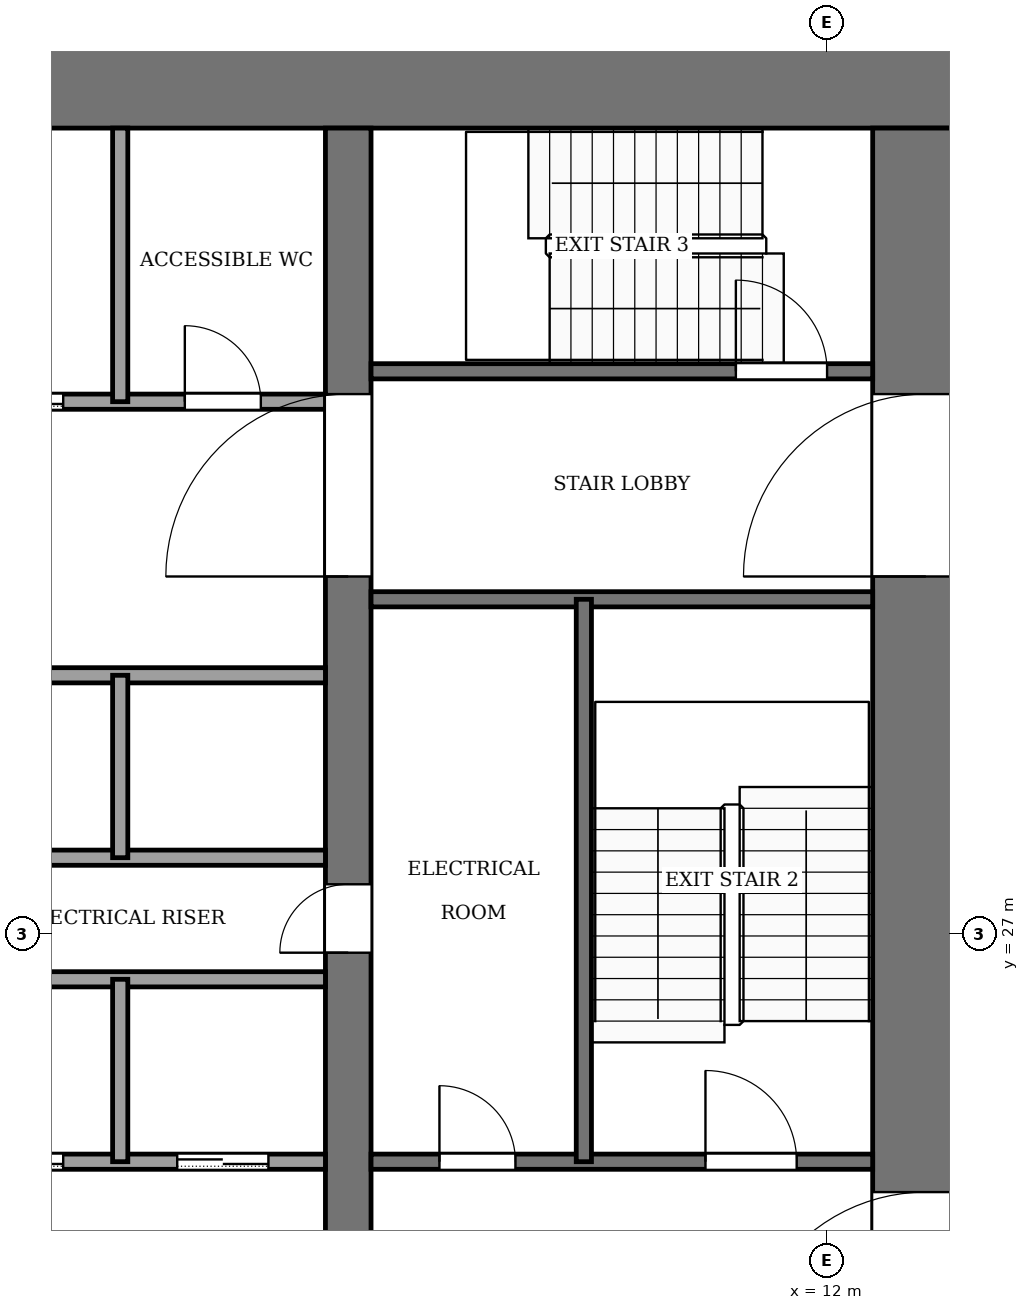
"""IFC4 building model, lengths in metres.
Left out: names, types, materials, properties, quantities, classifications, styles, units other than length and angle.
Written with IfcOpenShell. Run it as: python <this file> out.ifc"""

import sys

from ifc_helpers import new_model, si_unit, direction, frame, frame_2d, origin, place, context, subcontext, project, spatial, rectangle, extrude, element, fill, save


model = new_model("IFC4")
c1 = context("Model", 3, precision=1e-05, world=origin(), true_north=direction((0.0, 1.0)))
c2 = subcontext(c1, "Body", "Model", "MODEL_VIEW")
j1 = project(units=[si_unit("LENGTHUNIT", "METRE"), si_unit("PLANEANGLEUNIT", "RADIAN")], contexts=[c1])
p1 = place(None, origin())
s1 = spatial("IfcSite", under=j1, at=p1, CompositionType="ELEMENT")
p2 = place(p1, origin())
s2 = spatial("IfcBuilding", under=s1, at=p2, CompositionType="ELEMENT")
p3 = place(p2, frame((0.0, 0.0, 38.0)))
s3 = spatial("IfcBuildingStorey", under=s2, at=p3, CompositionType="ELEMENT", Elevation=38.0)
p4 = place(p3, frame((-14.0, 38.3, -0.13), z_axis=(0.0, 0.0, 1.0), x_axis=(1.0, 0.0, 0.0)))
e1 = element("IfcWall", 1, at=p4, inside=s3, PredefinedType="SHEAR", context=c2, shape_type="SweptSolid", body=[
    extrude(rectangle(XDim=28.0, YDim=1.4, at=frame_2d((14.0, 0.0))), origin(), (0.0, 0.0, 1.0), 4.0),
])
p5 = place(p3, frame((13.3, 18.4, -0.13), z_axis=(0.0, 0.0, 1.0), x_axis=(0.0, 1.0, 0.0)))
e2 = element("IfcWall", 2, at=p5, inside=s3, PredefinedType="SHEAR", context=c2, shape_type="SweptSolid", body=[
    extrude(rectangle(XDim=19.2, YDim=1.4, at=frame_2d((9.6, 0.0))), origin(), (0.0, 0.0, 1.0), 4.0),
])
p6 = place(p5, frame((2.8, 0.0, 0.13)))
e3 = element("IfcOpeningElement", 3, at=p6, cuts=e2, PredefinedType="OPENING", context=c2, shape_type="SweptSolid", body=[
    extrude(rectangle(XDim=2.4, YDim=2.4, at=frame_2d((1.2, 1.2))), frame((0.0, 0.71, 0.0), z_axis=(0.0, -1.0, 0.0), x_axis=(1.0, 0.0, 0.0)), (0.0, 0.0, 1.0), 1.42),
])
p7 = place(p5, frame((13.3, 0.0, 0.13)))
e4 = element("IfcOpeningElement", 4, at=p7, cuts=e2, PredefinedType="OPENING", context=c2, shape_type="SweptSolid", body=[
    extrude(rectangle(XDim=2.4, YDim=2.4, at=frame_2d((1.2, 1.2))), frame((0.0, 0.71, 0.0), z_axis=(0.0, -1.0, 0.0), x_axis=(1.0, 0.0, 0.0)), (0.0, 0.0, 1.0), 1.42),
])
p8 = place(p3, frame((5.7, 18.4, -0.13), z_axis=(0.0, 0.0, 1.0), x_axis=(0.0, 1.0, 0.0)))
e5 = element("IfcWall", 5, at=p8, inside=s3, PredefinedType="SHEAR", context=c2, shape_type="SweptSolid", body=[
    extrude(rectangle(XDim=19.2, YDim=0.6, at=frame_2d((9.6, 0.0))), origin(), (0.0, 0.0, 1.0), 4.0),
])
p9 = place(p8, frame((8.35, 0.0, 0.13)))
e6 = element("IfcOpeningElement", 6, at=p9, cuts=e5, PredefinedType="OPENING", context=c2, shape_type="SweptSolid", body=[
    extrude(rectangle(XDim=0.9, YDim=2.1, at=frame_2d((0.45, 1.05))), frame((0.0, 0.31, 0.0), z_axis=(0.0, -1.0, 0.0), x_axis=(1.0, 0.0, 0.0)), (0.0, 0.0, 1.0), 0.62),
])
p10 = place(p8, frame((13.3, 0.0, 0.13)))
e7 = element("IfcOpeningElement", 7, at=p10, cuts=e5, PredefinedType="OPENING", context=c2, shape_type="SweptSolid", body=[
    extrude(rectangle(XDim=2.4, YDim=2.4, at=frame_2d((1.2, 1.2))), frame((0.0, 0.31, 0.0), z_axis=(0.0, -1.0, 0.0), x_axis=(1.0, 0.0, 0.0)), (0.0, 0.0, 1.0), 0.62),
])
p11 = place(p3, frame((-5.4, 24.0, 0.0), z_axis=(0.0, 0.0, 1.0), x_axis=(1.0, 0.0, 0.0)))
e8 = element("IfcWall", 8, at=p11, inside=s3, PredefinedType="PARTITIONING", context=c2, shape_type="SweptSolid", body=[
    extrude(rectangle(XDim=10.8, YDim=0.2, at=frame_2d((5.4, 0.0))), origin(), (0.0, 0.0, 1.0), 3.87),
])
p12 = place(p11, frame((0.75, 0.0, 0.0)))
e9 = element("IfcOpeningElement", 9, at=p12, cuts=e8, PredefinedType="OPENING", context=c2, shape_type="SweptSolid", body=[
    extrude(rectangle(XDim=1.2, YDim=2.2, at=frame_2d((0.6, 1.1))), frame((0.0, 0.11, 0.0), z_axis=(0.0, -1.0, 0.0), x_axis=(1.0, 0.0, 0.0)), (0.0, 0.0, 1.0), 0.22),
])
p13 = place(p11, frame((3.45, 0.0, 0.0)))
e10 = element("IfcOpeningElement", 10, at=p13, cuts=e8, PredefinedType="OPENING", context=c2, shape_type="SweptSolid", body=[
    extrude(rectangle(XDim=1.2, YDim=2.2, at=frame_2d((0.6, 1.1))), frame((0.0, 0.11, 0.0), z_axis=(0.0, -1.0, 0.0), x_axis=(1.0, 0.0, 0.0)), (0.0, 0.0, 1.0), 0.22),
])
p14 = place(p11, frame((6.15, 0.0, 0.0)))
e11 = element("IfcOpeningElement", 11, at=p14, cuts=e8, PredefinedType="OPENING", context=c2, shape_type="SweptSolid", body=[
    extrude(rectangle(XDim=1.2, YDim=2.2, at=frame_2d((0.6, 1.1))), frame((0.0, 0.11, 0.0), z_axis=(0.0, -1.0, 0.0), x_axis=(1.0, 0.0, 0.0)), (0.0, 0.0, 1.0), 0.22),
])
p15 = place(p11, frame((8.85, 0.0, 0.0)))
e12 = element("IfcOpeningElement", 12, at=p15, cuts=e8, PredefinedType="OPENING", context=c2, shape_type="SweptSolid", body=[
    extrude(rectangle(XDim=1.2, YDim=2.2, at=frame_2d((0.6, 1.1))), frame((0.0, 0.11, 0.0), z_axis=(0.0, -1.0, 0.0), x_axis=(1.0, 0.0, 0.0)), (0.0, 0.0, 1.0), 0.22),
])
p16 = place(p3, frame((6.0, 24.0, 0.0), z_axis=(0.0, 0.0, 1.0), x_axis=(1.0, 0.0, 0.0)))
e13 = element("IfcWall", 13, at=p16, inside=s3, PredefinedType="PARTITIONING", context=c2, shape_type="SweptSolid", body=[
    extrude(rectangle(XDim=6.6, YDim=0.2, at=frame_2d((3.3, 0.0))), origin(), (0.0, 0.0, 1.0), 3.87),
])
p17 = place(p16, frame((0.9, 0.0, 0.0)))
e14 = element("IfcOpeningElement", 14, at=p17, cuts=e13, PredefinedType="OPENING", context=c2, shape_type="SweptSolid", body=[
    extrude(rectangle(XDim=1.0, YDim=2.1, at=frame_2d((0.5, 1.05))), frame((0.0, 0.11, 0.0), z_axis=(0.0, -1.0, 0.0), x_axis=(1.0, 0.0, 0.0)), (0.0, 0.0, 1.0), 0.22),
])
p18 = place(p16, frame((4.4, 0.0, 0.0)))
e15 = element("IfcOpeningElement", 15, at=p18, cuts=e13, PredefinedType="OPENING", context=c2, shape_type="SweptSolid", body=[
    extrude(rectangle(XDim=1.2, YDim=2.2, at=frame_2d((0.6, 1.1))), frame((0.0, 0.11, 0.0), z_axis=(0.0, -1.0, 0.0), x_axis=(1.0, 0.0, 0.0)), (0.0, 0.0, 1.0), 0.22),
])
for number, where, z_axis, x_axis in (
    (16, (-5.4, 26.4, 0.0), (0.0, 0.0, 1.0), (1.0, 0.0, 0.0)),
    (17, (-5.4, 28.0, 0.0), (0.0, 0.0, 1.0), (1.0, 0.0, 0.0)),
    (18, (-5.4, 30.4, 0.0), (0.0, 0.0, 1.0), (1.0, 0.0, 0.0)),
):
    element("IfcWall", number, at=place(p3, frame(where, z_axis=z_axis, x_axis=x_axis)), inside=s3, PredefinedType="PARTITIONING", context=c2, shape_type="SweptSolid", body=[
        extrude(rectangle(XDim=10.8, YDim=0.2, at=frame_2d((5.4, 0.0))), origin(), (0.0, 0.0, 1.0), 3.87),
    ])
p19 = place(p3, frame((6.0, 31.4, 0.0), z_axis=(0.0, 0.0, 1.0), x_axis=(1.0, 0.0, 0.0)))
e19 = element("IfcWall", 19, at=p19, inside=s3, PredefinedType="PARTITIONING", context=c2, shape_type="SweptSolid", body=[
    extrude(rectangle(XDim=6.6, YDim=0.2, at=frame_2d((3.3, 0.0))), origin(), (0.0, 0.0, 1.0), 3.87),
])
p20 = place(p3, frame((-5.4, 34.0, 0.0), z_axis=(0.0, 0.0, 1.0), x_axis=(1.0, 0.0, 0.0)))
e20 = element("IfcWall", 20, at=p20, inside=s3, PredefinedType="PARTITIONING", context=c2, shape_type="SweptSolid", body=[
    extrude(rectangle(XDim=10.8, YDim=0.2, at=frame_2d((5.4, 0.0))), origin(), (0.0, 0.0, 1.0), 3.87),
])
p21 = place(p20, frame((6.15, 0.0, 0.0)))
e21 = element("IfcOpeningElement", 21, at=p21, cuts=e20, PredefinedType="OPENING", context=c2, shape_type="SweptSolid", body=[
    extrude(rectangle(XDim=1.2, YDim=2.2, at=frame_2d((0.6, 1.1))), frame((0.0, 0.11, 0.0), z_axis=(0.0, -1.0, 0.0), x_axis=(1.0, 0.0, 0.0)), (0.0, 0.0, 1.0), 0.22),
])
p22 = place(p20, frame((8.95, 0.0, 0.0)))
e22 = element("IfcOpeningElement", 22, at=p22, cuts=e20, PredefinedType="OPENING", context=c2, shape_type="SweptSolid", body=[
    extrude(rectangle(XDim=1.0, YDim=2.1, at=frame_2d((0.5, 1.05))), frame((0.0, 0.11, 0.0), z_axis=(0.0, -1.0, 0.0), x_axis=(1.0, 0.0, 0.0)), (0.0, 0.0, 1.0), 0.22),
])
p23 = place(p3, frame((6.0, 34.4, 0.0), z_axis=(0.0, 0.0, 1.0), x_axis=(1.0, 0.0, 0.0)))
e23 = element("IfcWall", 23, at=p23, inside=s3, PredefinedType="PARTITIONING", context=c2, shape_type="SweptSolid", body=[
    extrude(rectangle(XDim=6.6, YDim=0.2, at=frame_2d((3.3, 0.0))), origin(), (0.0, 0.0, 1.0), 3.87),
])
p24 = place(p23, frame((4.8, 0.0, 0.0)))
e24 = element("IfcOpeningElement", 24, at=p24, cuts=e23, PredefinedType="OPENING", context=c2, shape_type="SweptSolid", body=[
    extrude(rectangle(XDim=1.2, YDim=2.2, at=frame_2d((0.6, 1.1))), frame((0.0, 0.11, 0.0), z_axis=(0.0, -1.0, 0.0), x_axis=(1.0, 0.0, 0.0)), (0.0, 0.0, 1.0), 0.22),
])
for number, where, z_axis, x_axis in (
    (25, (2.7, 24.0, 0.0), (0.0, 0.0, 1.0), (0.0, 1.0, 0.0)),
    (26, (2.7, 28.0, 0.0), (0.0, 0.0, 1.0), (0.0, 1.0, 0.0)),
):
    element("IfcWall", number, at=place(p3, frame(where, z_axis=z_axis, x_axis=x_axis)), inside=s3, PredefinedType="PARTITIONING", context=c2, shape_type="SweptSolid", body=[
        extrude(rectangle(XDim=2.4, YDim=0.2, at=frame_2d((1.2, 0.0))), origin(), (0.0, 0.0, 1.0), 3.87),
    ])
p25 = place(p3, frame((2.7, 34.0, 0.0), z_axis=(0.0, 0.0, 1.0), x_axis=(0.0, 1.0, 0.0)))
e27 = element("IfcWall", 27, at=p25, inside=s3, PredefinedType="PARTITIONING", context=c2, shape_type="SweptSolid", body=[
    extrude(rectangle(XDim=3.6, YDim=0.2, at=frame_2d((1.8, 0.0))), origin(), (0.0, 0.0, 1.0), 3.87),
])
p26 = place(p3, frame((8.8, 24.0, 0.0), z_axis=(0.0, 0.0, 1.0), x_axis=(0.0, 1.0, 0.0)))
e28 = element("IfcWall", 28, at=p26, inside=s3, PredefinedType="PARTITIONING", context=c2, shape_type="SweptSolid", body=[
    extrude(rectangle(XDim=7.4, YDim=0.2, at=frame_2d((3.7, 0.0))), origin(), (0.0, 0.0, 1.0), 3.87),
])
p27 = place(p14, origin())
e29 = element("IfcDoor", 29, at=p27, inside=s3, OperationType="SLIDING_TO_LEFT", PredefinedType="DOOR", context=c2, shape_type="SweptSolid", body=[
    extrude(rectangle(XDim=1.2, YDim=2.2, at=frame_2d((0.6, 1.1))), frame((0.0, 0.025, 0.0), z_axis=(0.0, -1.0, 0.0), x_axis=(1.0, 0.0, 0.0)), (0.0, 0.0, 1.0), 0.05),
])
fill(e11, e29)
p28 = place(p15, origin())
e30 = element("IfcDoor", 30, at=p28, inside=s3, OperationType="SLIDING_TO_LEFT", PredefinedType="DOOR", context=c2, shape_type="SweptSolid", body=[
    extrude(rectangle(XDim=1.2, YDim=2.2, at=frame_2d((0.6, 1.1))), frame((0.0, 0.025, 0.0), z_axis=(0.0, -1.0, 0.0), x_axis=(1.0, 0.0, 0.0)), (0.0, 0.0, 1.0), 0.05),
])
fill(e12, e30)
p29 = place(p21, origin())
e31 = element("IfcDoor", 31, at=p29, inside=s3, OperationType="SLIDING_TO_LEFT", PredefinedType="DOOR", context=c2, shape_type="SweptSolid", body=[
    extrude(rectangle(XDim=1.2, YDim=2.2, at=frame_2d((0.6, 1.1))), frame((0.0, 0.025, 0.0), z_axis=(0.0, -1.0, 0.0), x_axis=(1.0, 0.0, 0.0)), (0.0, 0.0, 1.0), 0.05),
])
fill(e21, e31)
p30 = place(p17, origin())
e32 = element("IfcDoor", 32, at=p30, inside=s3, OperationType="SINGLE_SWING_RIGHT", PredefinedType="DOOR", context=c2, shape_type="SweptSolid", body=[
    extrude(rectangle(XDim=1.0, YDim=2.1, at=frame_2d((0.5, 1.05))), frame((0.0, 0.025, 0.0), z_axis=(0.0, -1.0, 0.0), x_axis=(1.0, 0.0, 0.0)), (0.0, 0.0, 1.0), 0.05),
])
fill(e14, e32)
p31 = place(p22, origin())
e33 = element("IfcDoor", 33, at=p31, inside=s3, OperationType="SINGLE_SWING_LEFT", PredefinedType="DOOR", context=c2, shape_type="SweptSolid", body=[
    extrude(rectangle(XDim=1.0, YDim=2.1, at=frame_2d((0.5, 1.05))), frame((0.0, 0.025, 0.0), z_axis=(0.0, -1.0, 0.0), x_axis=(1.0, 0.0, 0.0)), (0.0, 0.0, 1.0), 0.05),
])
fill(e22, e33)
p32 = place(p9, origin())
e34 = element("IfcDoor", 34, at=p32, inside=s3, OperationType="SINGLE_SWING_RIGHT", PredefinedType="DOOR", context=c2, shape_type="SweptSolid", body=[
    extrude(rectangle(XDim=0.9, YDim=2.1, at=frame_2d((0.45, 1.05))), frame((0.0, 0.025, 0.0), z_axis=(0.0, -1.0, 0.0), x_axis=(1.0, 0.0, 0.0)), (0.0, 0.0, 1.0), 0.05),
])
fill(e6, e34)
p33 = place(p18, origin())
e35 = element("IfcDoor", 35, at=p33, inside=s3, OperationType="SINGLE_SWING_LEFT", PredefinedType="DOOR", context=c2, shape_type="SweptSolid", body=[
    extrude(rectangle(XDim=1.2, YDim=2.2, at=frame_2d((0.6, 1.1))), frame((0.0, 0.025, 0.0), z_axis=(0.0, -1.0, 0.0), x_axis=(1.0, 0.0, 0.0)), (0.0, 0.0, 1.0), 0.05),
])
fill(e15, e35)
p34 = place(p24, origin())
e36 = element("IfcDoor", 36, at=p34, inside=s3, OperationType="SINGLE_SWING_RIGHT", PredefinedType="DOOR", context=c2, shape_type="SweptSolid", body=[
    extrude(rectangle(XDim=1.2, YDim=2.2, at=frame_2d((0.6, 1.1))), frame((0.0, 0.025, 0.0), z_axis=(0.0, -1.0, 0.0), x_axis=(1.0, 0.0, 0.0)), (0.0, 0.0, 1.0), 0.05),
])
fill(e24, e36)
p35 = place(p10, origin())
e37 = element("IfcDoor", 37, at=p35, inside=s3, OperationType="DOUBLE_DOOR_SINGLE_SWING", PredefinedType="DOOR", context=c2, shape_type="SweptSolid", body=[
    extrude(rectangle(XDim=2.4, YDim=2.4, at=frame_2d((1.2, 1.2))), frame((0.0, 0.025, 0.0), z_axis=(0.0, -1.0, 0.0), x_axis=(1.0, 0.0, 0.0)), (0.0, 0.0, 1.0), 0.05),
])
fill(e7, e37)
p36 = place(p6, origin())
e38 = element("IfcDoor", 38, at=p36, inside=s3, OperationType="DOUBLE_DOOR_SINGLE_SWING", PredefinedType="DOOR", context=c2, shape_type="SweptSolid", body=[
    extrude(rectangle(XDim=2.4, YDim=2.4, at=frame_2d((1.2, 1.2))), frame((0.0, 0.025, 0.0), z_axis=(0.0, -1.0, 0.0), x_axis=(1.0, 0.0, 0.0)), (0.0, 0.0, 1.0), 0.05),
])
fill(e3, e38)
p37 = place(p7, origin())
e39 = element("IfcDoor", 39, at=p37, inside=s3, OperationType="DOUBLE_DOOR_SINGLE_SWING", PredefinedType="DOOR", context=c2, shape_type="SweptSolid", body=[
    extrude(rectangle(XDim=2.4, YDim=2.4, at=frame_2d((1.2, 1.2))), frame((0.0, 0.025, 0.0), z_axis=(0.0, -1.0, 0.0), x_axis=(1.0, 0.0, 0.0)), (0.0, 0.0, 1.0), 0.05),
])
fill(e4, e39)
save(model, sys.argv[1])
